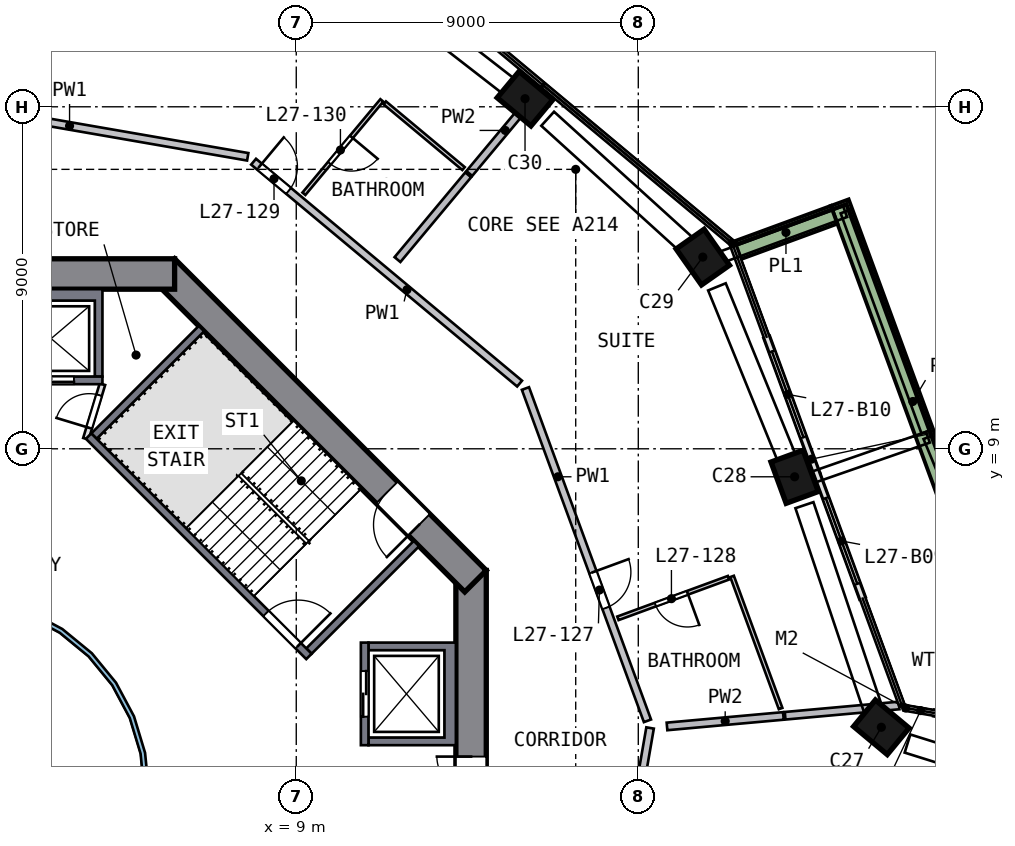
"""IFC4 building model, lengths in metres.
Left out: names, types, materials, properties, quantities, classifications, styles, units other than length and angle.
Written with IfcOpenShell. Run it as: python <this file> out.ifc"""

import sys

from ifc_helpers import new_model, si_unit, direction, frame, frame_2d, origin, origin_2d, place, context, subcontext, project, spatial, polyline, rectangle, outline, extrude, element, fill, save


model = new_model("IFC4")
c1 = context("Model", 3, precision=1e-05, world=origin(), true_north=direction((0.0, 1.0)))
c2 = subcontext(c1, "Body", "Model", "MODEL_VIEW")
j1 = project(units=[si_unit("LENGTHUNIT", "METRE"), si_unit("PLANEANGLEUNIT", "RADIAN")], contexts=[c1])
p1 = place(None, origin())
s1 = spatial("IfcSite", under=j1, at=p1, CompositionType="ELEMENT")
p2 = place(p1, origin())
s2 = spatial("IfcBuilding", under=s1, at=p2, CompositionType="ELEMENT")
p3 = place(p2, frame((0.0, 0.0, 115.0)))
s3 = spatial("IfcBuildingStorey", under=s2, at=p3, CompositionType="ELEMENT", Elevation=115.0)
p4 = place(p3, frame((26.622, 0.833, 0.0), z_axis=(-0.154101199, 0.147745739, 0.976946271), x_axis=(-0.973407273, 0.146921481, -0.175762225)))
e1 = element("IfcColumn", 1, at=p4, inside=s3, PredefinedType="COLUMN", context=c2, shape_type="SweptSolid", body=[
    extrude(rectangle(XDim=0.8, YDim=0.8, at=origin_2d()), origin(), (0.0, 0.0, 1.0), 3.265),
])
p5 = place(p3, frame((24.406, 1.532, 0.0), z_axis=(-0.008285658, 0.115999212, 0.993214746), x_axis=(0.769837685, -0.633159234, 0.080369914)))
e2 = element("IfcColumn", 2, at=p5, inside=s3, PredefinedType="COLUMN", context=c2, shape_type="SweptSolid", body=[
    extrude(rectangle(XDim=1.15, YDim=0.9, at=origin_2d()), origin(), (0.0, 0.0, 1.0), 3.212),
])
p6 = place(p3, frame((22.162, 8.136, 0.0), z_axis=(-0.039546221, 0.105101688, 0.993674862), x_axis=(-0.342030908, 0.932955243, -0.11229146)))
e3 = element("IfcColumn", 3, at=p6, inside=s3, PredefinedType="COLUMN", context=c2, shape_type="SweptSolid", body=[
    extrude(rectangle(XDim=1.15, YDim=0.9, at=origin_2d()), origin(), (0.0, 0.0, 1.0), 3.21),
])
p7 = place(p3, frame((19.779, 13.932, 0.0), z_axis=(-0.067055052, 0.093512147, 0.993357488), x_axis=(0.571992313, -0.812148283, 0.115065024)))
e4 = element("IfcColumn", 4, at=p7, inside=s3, PredefinedType="COLUMN", context=c2, shape_type="SweptSolid", body=[
    extrude(rectangle(XDim=1.15, YDim=0.9, at=origin_2d()), origin(), (0.0, 0.0, 1.0), 3.211),
])
p8 = place(p3, frame((15.125, 18.127, 0.0), z_axis=(-0.086849132, 0.071258876, 0.993669664), x_axis=(-0.7628125, 0.636786768, -0.112337447)))
e5 = element("IfcColumn", 5, at=p8, inside=s3, PredefinedType="COLUMN", context=c2, shape_type="SweptSolid", body=[
    extrude(rectangle(XDim=1.15, YDim=0.9, at=origin_2d()), origin(), (0.0, 0.0, 1.0), 3.21),
])
p9 = place(p3, frame((13.6, -5.799, 0.0), z_axis=(0.0, 0.0, 1.0), x_axis=(0.0, 1.0, 0.0)))
e6 = element("IfcWall", 6, at=p9, inside=s3, PredefinedType="SHEAR", context=c2, shape_type="SweptSolid", body=[
    extrude(rectangle(XDim=11.598, YDim=0.8, at=frame_2d((5.799, 0.0))), origin(), (0.0, 0.0, 1.0), 3.5),
])
p10 = place(p9, frame((4.899, 0.0, 0.0)))
e7 = element("IfcOpeningElement", 7, at=p10, cuts=e6, PredefinedType="OPENING", context=c2, shape_type="SweptSolid", body=[
    extrude(rectangle(XDim=1.8, YDim=2.1, at=frame_2d((0.9, 1.05))), frame((0.0, 0.41, 0.0), z_axis=(0.0, -1.0, 0.0), x_axis=(1.0, 0.0, 0.0)), (0.0, 0.0, 1.0), 0.82),
])
p11 = place(p3, frame((13.717, 5.516, 0.0), z_axis=(0.0, 0.0, 1.0), x_axis=(-0.707106781, 0.707106781, 0.0)))
e8 = element("IfcWall", 8, at=p11, inside=s3, PredefinedType="SHEAR", context=c2, shape_type="SweptSolid", body=[
    extrude(rectangle(XDim=11.598, YDim=0.8, at=frame_2d((5.799, 0.0))), origin(), (0.0, 0.0, 1.0), 3.5),
])
p12 = place(p11, frame((2.099, 0.0, 0.0)))
e9 = element("IfcOpeningElement", 9, at=p12, cuts=e8, PredefinedType="OPENING", context=c2, shape_type="SweptSolid", body=[
    extrude(rectangle(XDim=1.2, YDim=2.1, at=frame_2d((0.6, 1.05))), frame((0.0, 0.41, 0.0), z_axis=(0.0, -1.0, 0.0), x_axis=(1.0, 0.0, 0.0)), (0.0, 0.0, 1.0), 0.82),
])
p13 = place(p3, frame((5.799, 13.6, 0.0), z_axis=(0.0, 0.0, 1.0), x_axis=(-1.0, 0.0, 0.0)))
e10 = element("IfcWall", 10, at=p13, inside=s3, PredefinedType="SHEAR", context=c2, shape_type="SweptSolid", body=[
    extrude(rectangle(XDim=11.598, YDim=0.8, at=frame_2d((5.799, 0.0))), origin(), (0.0, 0.0, 1.0), 3.5),
])
p14 = place(p13, frame((4.899, 0.0, 0.0)))
e11 = element("IfcOpeningElement", 11, at=p14, cuts=e10, PredefinedType="OPENING", context=c2, shape_type="SweptSolid", body=[
    extrude(rectangle(XDim=1.8, YDim=2.1, at=frame_2d((0.9, 1.05))), frame((0.0, 0.41, 0.0), z_axis=(0.0, -1.0, 0.0), x_axis=(1.0, 0.0, 0.0)), (0.0, 0.0, 1.0), 0.82),
])
p15 = place(p3, frame((27.245, 1.795, 0.0), z_axis=(0.0, 0.0, 1.0), x_axis=(-0.985283183, 0.170929952, 0.0)))
e12 = element("IfcWall", 12, at=p15, inside=s3, PredefinedType="SOLIDWALL", context=c2, shape_type="SweptSolid", body=[
    extrude(rectangle(XDim=1.478, YDim=0.15, at=frame_2d((0.739, 0.0))), origin(), (0.0, 0.0, 1.0), 2.425),
])
p16 = place(p3, frame((23.899, 5.073, 0.0), z_axis=(0.0, 0.0, 1.0), x_axis=(-0.344663339, 0.938726362, 0.0)))
e13 = element("IfcWall", 13, at=p16, inside=s3, PredefinedType="SOLIDWALL", context=c2, shape_type="SweptSolid", body=[
    extrude(rectangle(XDim=3.475, YDim=0.15, at=frame_2d((1.738, 0.0))), origin(), (0.0, 0.0, 1.0), 2.425),
])
p17 = place(p16, frame((0.4, 0.0, 0.0)))
e14 = element("IfcOpeningElement", 14, at=p17, cuts=e13, PredefinedType="OPENING", context=c2, shape_type="SweptSolid", body=[
    extrude(rectangle(XDim=2.4, YDim=2.4, at=frame_2d((1.2, 1.2))), frame((0.0, 0.085, 0.0), z_axis=(0.0, -1.0, 0.0), x_axis=(1.0, 0.0, 0.0)), (0.0, 0.0, 1.0), 0.17),
])
p18 = place(p3, frame((22.702, 8.335, 0.0), z_axis=(0.0, 0.0, 1.0), x_axis=(-0.344634313, 0.938737019, 0.0)))
e15 = element("IfcWall", 15, at=p18, inside=s3, PredefinedType="SOLIDWALL", context=c2, shape_type="SweptSolid", body=[
    extrude(rectangle(XDim=3.835, YDim=0.15, at=frame_2d((1.917, 0.0))), origin(), (0.0, 0.0, 1.0), 2.425),
])
p19 = place(p18, frame((1.035, 0.0, 0.0)))
e16 = element("IfcOpeningElement", 16, at=p19, cuts=e15, PredefinedType="OPENING", context=c2, shape_type="SweptSolid", body=[
    extrude(rectangle(XDim=2.4, YDim=2.4, at=frame_2d((1.2, 1.2))), frame((0.0, 0.085, 0.0), z_axis=(0.0, -1.0, 0.0), x_axis=(1.0, 0.0, 0.0)), (0.0, 0.0, 1.0), 0.17),
])
p20 = place(p3, frame((27.145, 5.01, 0.0), z_axis=(0.0, 0.0, 1.0), x_axis=(-0.344632839, 0.93873756, 0.0)))
e17 = element("IfcWall", 17, at=p20, inside=s3, PredefinedType="SOLIDWALL", context=c2, shape_type="SweptSolid", body=[
    extrude(rectangle(XDim=11.152, YDim=0.5, at=frame_2d((5.576, 0.0))), origin(), (0.0, 0.0, 1.0), 0.7),
])
p21 = place(p3, frame((23.153, 15.158, 0.0), z_axis=(0.0, 0.0, 1.0), x_axis=(-0.93869784, -0.344741011, 0.0)))
e18 = element("IfcWall", 18, at=p21, inside=s3, PredefinedType="SOLIDWALL", context=c2, shape_type="SweptSolid", body=[
    extrude(rectangle(XDim=2.699, YDim=0.5, at=frame_2d((1.35, 0.0))), origin(), (0.0, 0.0, 1.0), 0.7),
])
p22 = place(p3, origin())
e19 = element("IfcWall", 19, at=p22, inside=s3, PredefinedType="SOLIDWALL", context=c2, shape_type="SweptSolid", body=[
    extrude(outline(polyline([(13.2, 3.9), (13.2, 1.2), (10.9, 1.2), (10.9, 1.4), (12.9, 1.4), (12.9, 3.7), (10.9, 3.7), (10.9, 3.9), (13.2, 3.9)])), origin(), (0.0, 0.0, 1.0), 3.19),
])
p23 = place(p3, frame((10.8, 1.2, 0.0), z_axis=(0.0, 0.0, 1.0), x_axis=(0.0, 1.0, 0.0)))
e20 = element("IfcWall", 20, at=p23, inside=s3, PredefinedType="SOLIDWALL", context=c2, shape_type="SweptSolid", body=[
    extrude(rectangle(XDim=2.7, YDim=0.2, at=frame_2d((1.35, 0.0))), origin(), (0.0, 0.0, 1.0), 3.19),
])
p24 = place(p23, frame((0.75, 0.0, 0.0)))
e21 = element("IfcOpeningElement", 21, at=p24, cuts=e20, PredefinedType="OPENING", context=c2, shape_type="SweptSolid", body=[
    extrude(rectangle(XDim=1.2, YDim=2.1, at=frame_2d((0.6, 1.05))), frame((0.0, 0.11, 0.0), z_axis=(0.0, -1.0, 0.0), x_axis=(1.0, 0.0, 0.0)), (0.0, 0.0, 1.0), 0.22),
])
p25 = place(p3, origin())
e22 = element("IfcWall", 22, at=p25, inside=s3, PredefinedType="SOLIDWALL", context=c2, shape_type="SweptSolid", body=[
    extrude(outline(polyline([(3.9, 13.2), (3.9, 10.9), (3.7, 10.9), (3.7, 12.9), (1.4, 12.9), (1.4, 10.9), (1.2, 10.9), (1.2, 13.2), (3.9, 13.2)])), origin(), (0.0, 0.0, 1.0), 3.19),
])
p26 = place(p3, frame((1.2, 10.8, 0.0), z_axis=(0.0, 0.0, 1.0), x_axis=(1.0, 0.0, 0.0)))
e23 = element("IfcWall", 23, at=p26, inside=s3, PredefinedType="SOLIDWALL", context=c2, shape_type="SweptSolid", body=[
    extrude(rectangle(XDim=2.7, YDim=0.2, at=frame_2d((1.35, 0.0))), origin(), (0.0, 0.0, 1.0), 3.19),
])
p27 = place(p26, frame((0.75, 0.0, 0.0)))
e24 = element("IfcOpeningElement", 24, at=p27, cuts=e23, PredefinedType="OPENING", context=c2, shape_type="SweptSolid", body=[
    extrude(rectangle(XDim=1.2, YDim=2.1, at=frame_2d((0.6, 1.05))), frame((0.0, 0.11, 0.0), z_axis=(0.0, -1.0, 0.0), x_axis=(1.0, 0.0, 0.0)), (0.0, 0.0, 1.0), 0.22),
])
p28 = place(p3, frame((3.535, 9.334, 0.0), z_axis=(0.0, 0.0, 1.0), x_axis=(0.707106781, -0.707106781, 0.0)))
e25 = element("IfcWall", 25, at=p28, inside=s3, PredefinedType="SOLIDWALL", context=c2, shape_type="SweptSolid", body=[
    extrude(rectangle(XDim=8.2, YDim=0.2, at=frame_2d((4.1, 0.0))), origin(), (0.0, 0.0, 1.0), 3.19),
])
p29 = place(p28, frame((6.6, 0.0, 0.0)))
e26 = element("IfcOpeningElement", 26, at=p29, cuts=e25, PredefinedType="OPENING", context=c2, shape_type="SweptSolid", body=[
    extrude(rectangle(XDim=1.2, YDim=2.1, at=frame_2d((0.6, 1.05))), frame((0.0, 0.11, 0.0), z_axis=(0.0, -1.0, 0.0), x_axis=(1.0, 0.0, 0.0)), (0.0, 0.0, 1.0), 0.22),
])
for number, where, z_axis, x_axis in (
    (27, (9.334, 3.677, 0.0), (0.0, 0.0, 1.0), (0.707, 0.707, 0.0)),
    (28, (3.677, 9.334, 0.0), (0.0, 0.0, 1.0), (0.707, 0.707, 0.0)),
):
    element("IfcWall", number, at=place(p3, frame(where, z_axis=z_axis, x_axis=x_axis)), inside=s3, PredefinedType="SOLIDWALL", context=c2, shape_type="SweptSolid", body=[
        extrude(rectangle(XDim=4.0, YDim=0.2, at=frame_2d((2.0, 0.0))), origin(), (0.0, 0.0, 1.0), 3.19),
    ])
p30 = place(p3, frame((3.465, 9.263, 0.0), z_axis=(0.0, 0.0, 1.0), x_axis=(0.289808785, 0.957084567, 0.0)))
e29 = element("IfcWall", 29, at=p30, inside=s3, PredefinedType="PARTITIONING", context=c2, shape_type="SweptSolid", body=[
    extrude(rectangle(XDim=1.501, YDim=0.15, at=frame_2d((0.75, 0.0))), origin(), (0.0, 0.0, 1.0), 3.19),
])
p31 = place(p30, frame((0.301, 0.0, 0.0)))
e30 = element("IfcOpeningElement", 30, at=p31, cuts=e29, PredefinedType="OPENING", context=c2, shape_type="SweptSolid", body=[
    extrude(rectangle(XDim=0.9, YDim=2.1, at=frame_2d((0.45, 1.05))), frame((0.0, 0.085, 0.0), z_axis=(0.0, -1.0, 0.0), x_axis=(1.0, 0.0, 0.0)), (0.0, 0.0, 1.0), 0.17),
])
p32 = place(p3, origin())
e31 = element("IfcWall", 31, at=p32, inside=s3, PredefinedType="SOLIDWALL", context=c2, shape_type="SweptSolid", body=[
    extrude(outline(polyline([(5.021, -0.999), (4.73, -1.959), (4.257, -2.844), (3.62, -3.62), (2.844, -4.257), (1.959, -4.73), (0.999, -5.021), (0.0, -5.12), (-0.999, -5.021), (-1.959, -4.73), (-2.844, -4.257), (-3.62, -3.62), (-4.257, -2.844), (-4.73, -1.959), (-5.021, -0.999), (-5.12, 0.0), (-5.021, 0.999), (-4.73, 1.959), (-4.257, 2.844), (-3.62, 3.62), (-2.844, 4.257), (-1.959, 4.73), (-0.999, 5.021), (0.0, 5.12), (0.999, 5.021), (1.959, 4.73), (2.844, 4.257), (3.62, 3.62), (4.257, 2.844), (4.73, 1.959), (5.021, 0.999), (5.12, 0.0), (5.021, -0.999)]), holes=[polyline([(4.904, 0.976), (4.619, 1.913), (4.157, 2.778), (3.535, 3.535), (2.778, 4.157), (1.913, 4.619), (0.976, 4.904), (0.0, 5.0), (-0.976, 4.904), (-1.913, 4.619), (-2.778, 4.157), (-3.535, 3.535), (-4.157, 2.778), (-4.619, 1.913), (-4.904, 0.976), (-5.0, 0.0), (-4.904, -0.976), (-4.619, -1.913), (-4.157, -2.778), (-3.535, -3.535), (-2.778, -4.157), (-1.913, -4.619), (-0.976, -4.904), (0.0, -5.0), (0.976, -4.904), (1.913, -4.619), (2.778, -4.157), (3.535, -3.535), (4.157, -2.778), (4.619, -1.913), (4.904, -0.976), (5.0, 0.0), (4.904, 0.976)])]), origin(), (0.0, 0.0, 1.0), 3.19),
])
p33 = place(p3, frame((7.723, 16.684, 0.0), z_axis=(0.0, 0.0, 1.0), x_axis=(-0.985289421, 0.170893991, 0.0)))
e32 = element("IfcWall", 32, at=p33, inside=s3, PredefinedType="SOLIDWALL", context=c2, shape_type="SweptSolid", body=[
    extrude(rectangle(XDim=9.516, YDim=0.2, at=frame_2d((4.758, 0.0))), origin(), (0.0, 0.0, 1.0), 3.19),
])
p34 = place(p3, frame((7.877, 16.555, 0.0), z_axis=(0.0, 0.0, 1.0), x_axis=(0.767836961, -0.6406453, 0.0)))
e33 = element("IfcWall", 33, at=p34, inside=s3, PredefinedType="SOLIDWALL", context=c2, shape_type="SweptSolid", body=[
    extrude(rectangle(XDim=9.115, YDim=0.2, at=frame_2d((4.558, 0.0))), origin(), (0.0, 0.0, 1.0), 3.19),
])
p35 = place(p34, frame((0.2, 0.0, 0.0)))
e34 = element("IfcOpeningElement", 34, at=p35, cuts=e33, PredefinedType="OPENING", context=c2, shape_type="SweptSolid", body=[
    extrude(rectangle(XDim=1.0, YDim=2.1, at=frame_2d((0.5, 1.05))), frame((0.0, 0.11, 0.0), z_axis=(0.0, -1.0, 0.0), x_axis=(1.0, 0.0, 0.0)), (0.0, 0.0, 1.0), 0.22),
])
p36 = place(p3, frame((15.031, 10.587, 0.0), z_axis=(0.0, 0.0, 1.0), x_axis=(0.344638859, -0.93873535, 0.0)))
e35 = element("IfcWall", 35, at=p36, inside=s3, PredefinedType="SOLIDWALL", context=c2, shape_type="SweptSolid", body=[
    extrude(rectangle(XDim=9.316, YDim=0.2, at=frame_2d((4.658, 0.0))), origin(), (0.0, 0.0, 1.0), 3.19),
])
p37 = place(p36, frame((5.15, 0.0, 0.0)))
e36 = element("IfcOpeningElement", 36, at=p37, cuts=e35, PredefinedType="OPENING", context=c2, shape_type="SweptSolid", body=[
    extrude(rectangle(XDim=1.0, YDim=2.1, at=frame_2d((0.5, 1.05))), frame((0.0, 0.11, 0.0), z_axis=(0.0, -1.0, 0.0), x_axis=(1.0, 0.0, 0.0)), (0.0, 0.0, 1.0), 0.22),
])
p38 = place(p3, frame((17.719, -1.754, 0.0), z_axis=(0.0, 0.0, 1.0), x_axis=(0.170909172, 0.985286788, 0.0)))
e37 = element("IfcWall", 37, at=p38, inside=s3, PredefinedType="SOLIDWALL", context=c2, shape_type="SweptSolid", body=[
    extrude(rectangle(XDim=3.458, YDim=0.2, at=frame_2d((1.729, 0.0))), origin(), (0.0, 0.0, 1.0), 3.19),
])
p39 = place(p3, frame((11.663, 13.979, 0.0), z_axis=(0.0, 0.0, 1.0), x_axis=(0.64065553, 0.767828426, 0.0)))
e38 = element("IfcWall", 38, at=p39, inside=s3, PredefinedType="SOLIDWALL", context=c2, shape_type="SweptSolid", body=[
    extrude(rectangle(XDim=2.905, YDim=0.2, at=frame_2d((1.452, 0.0))), origin(), (0.0, 0.0, 1.0), 3.19),
])
p40 = place(p3, frame((13.554, 16.245, 0.0), z_axis=(0.0, 0.0, 1.0), x_axis=(0.640639847, 0.767841511, 0.0)))
e39 = element("IfcWall", 39, at=p40, inside=s3, PredefinedType="SOLIDWALL", context=c2, shape_type="SweptSolid", body=[
    extrude(rectangle(XDim=2.952, YDim=0.2, at=frame_2d((1.476, 0.0))), origin(), (0.0, 0.0, 1.0), 3.19),
])
p41 = place(p3, frame((18.756, 1.694, 0.0), z_axis=(0.0, 0.0, 1.0), x_axis=(0.995945109, 0.089962992, 0.0)))
e40 = element("IfcWall", 40, at=p41, inside=s3, PredefinedType="SOLIDWALL", context=c2, shape_type="SweptSolid", body=[
    extrude(rectangle(XDim=3.075, YDim=0.2, at=frame_2d((1.537, 0.0))), origin(), (0.0, 0.0, 1.0), 3.19),
])
p42 = place(p3, frame((21.864, 1.974, 0.0), z_axis=(0.0, 0.0, 1.0), x_axis=(0.995949501, 0.08991436, 0.0)))
e41 = element("IfcWall", 41, at=p42, inside=s3, PredefinedType="SOLIDWALL", context=c2, shape_type="SweptSolid", body=[
    extrude(rectangle(XDim=3.011, YDim=0.2, at=frame_2d((1.506, 0.0))), origin(), (0.0, 0.0, 1.0), 3.19),
])
p43 = place(p3, frame((11.251, 18.168, 0.0), z_axis=(0.0, 0.0, 1.0), x_axis=(-0.640612028, -0.767864721, 0.0)))
e42 = element("IfcWall", 42, at=p43, inside=s3, PredefinedType="PARTITIONING", context=c2, shape_type="SweptSolid", body=[
    extrude(rectangle(XDim=3.2, YDim=0.1, at=frame_2d((1.6, 0.0))), origin(), (0.0, 0.0, 1.0), 3.19),
])
p44 = place(p43, frame((1.25, 0.0, 0.0)))
e43 = element("IfcOpeningElement", 43, at=p44, cuts=e42, PredefinedType="OPENING", context=c2, shape_type="SweptSolid", body=[
    extrude(rectangle(XDim=0.9, YDim=2.1, at=frame_2d((0.45, 1.05))), frame((0.0, 0.06, 0.0), z_axis=(0.0, -1.0, 0.0), x_axis=(1.0, 0.0, 0.0)), (0.0, 0.0, 1.0), 0.12),
])
p45 = place(p3, frame((11.328, 18.104, 0.0), z_axis=(0.0, 0.0, 1.0), x_axis=(0.767813462, -0.640673464, 0.0)))
e44 = element("IfcWall", 44, at=p45, inside=s3, PredefinedType="PARTITIONING", context=c2, shape_type="SweptSolid", body=[
    extrude(rectangle(XDim=2.7, YDim=0.1, at=frame_2d((1.35, 0.0))), origin(), (0.0, 0.0, 1.0), 3.19),
])
p46 = place(p3, frame((20.374, 5.607, 0.0), z_axis=(0.0, 0.0, 1.0), x_axis=(-0.938740488, -0.344624864, 0.0)))
e45 = element("IfcWall", 45, at=p46, inside=s3, PredefinedType="PARTITIONING", context=c2, shape_type="SweptSolid", body=[
    extrude(rectangle(XDim=3.1, YDim=0.1, at=frame_2d((1.55, 0.0))), origin(), (0.0, 0.0, 1.0), 3.19),
])
p47 = place(p46, frame((1.15, 0.0, 0.0)))
e46 = element("IfcOpeningElement", 46, at=p47, cuts=e45, PredefinedType="OPENING", context=c2, shape_type="SweptSolid", body=[
    extrude(rectangle(XDim=0.9, YDim=2.1, at=frame_2d((0.45, 1.05))), frame((0.0, 0.06, 0.0), z_axis=(0.0, -1.0, 0.0), x_axis=(1.0, 0.0, 0.0)), (0.0, 0.0, 1.0), 0.12),
])
p48 = place(p3, frame((20.468, 5.642, 0.0), z_axis=(0.0, 0.0, 1.0), x_axis=(0.344636129, -0.938736352, 0.0)))
e47 = element("IfcWall", 47, at=p48, inside=s3, PredefinedType="PARTITIONING", context=c2, shape_type="SweptSolid", body=[
    extrude(rectangle(XDim=3.704, YDim=0.1, at=frame_2d((1.852, 0.0))), origin(), (0.0, 0.0, 1.0), 3.19),
])
p49 = place(p17, origin())
e48 = element("IfcDoor", 48, at=p49, inside=s3, OperationType="SLIDING_TO_RIGHT", PredefinedType="DOOR", context=c2, shape_type="SweptSolid", body=[
    extrude(rectangle(XDim=2.4, YDim=2.4, at=frame_2d((1.2, 1.2))), frame((0.0, 0.025, 0.0), z_axis=(0.0, -1.0, 0.0), x_axis=(1.0, 0.0, 0.0)), (0.0, 0.0, 1.0), 0.05),
])
fill(e14, e48)
p50 = place(p19, origin())
e49 = element("IfcDoor", 49, at=p50, inside=s3, OperationType="SLIDING_TO_LEFT", PredefinedType="DOOR", context=c2, shape_type="SweptSolid", body=[
    extrude(rectangle(XDim=2.4, YDim=2.4, at=frame_2d((1.2, 1.2))), frame((0.0, 0.025, 0.0), z_axis=(0.0, -1.0, 0.0), x_axis=(1.0, 0.0, 0.0)), (0.0, 0.0, 1.0), 0.05),
])
fill(e16, e49)
p51 = place(p24, origin())
e50 = element("IfcDoor", 50, at=p51, inside=s3, OperationType="DOUBLE_DOOR_SLIDING", PredefinedType="DOOR", context=c2, shape_type="SweptSolid", body=[
    extrude(rectangle(XDim=1.2, YDim=2.1, at=frame_2d((0.6, 1.05))), frame((0.0, 0.025, 0.0), z_axis=(0.0, -1.0, 0.0), x_axis=(1.0, 0.0, 0.0)), (0.0, 0.0, 1.0), 0.05),
])
fill(e21, e50)
p52 = place(p27, origin())
e51 = element("IfcDoor", 51, at=p52, inside=s3, OperationType="DOUBLE_DOOR_SLIDING", PredefinedType="DOOR", context=c2, shape_type="SweptSolid", body=[
    extrude(rectangle(XDim=1.2, YDim=2.1, at=frame_2d((0.6, 1.05))), frame((0.0, 0.025, 0.0), z_axis=(0.0, -1.0, 0.0), x_axis=(1.0, 0.0, 0.0)), (0.0, 0.0, 1.0), 0.05),
])
fill(e24, e51)
p53 = place(p29, origin())
e52 = element("IfcDoor", 52, at=p53, inside=s3, OperationType="SINGLE_SWING_RIGHT", PredefinedType="DOOR", context=c2, shape_type="SweptSolid", body=[
    extrude(rectangle(XDim=1.2, YDim=2.1, at=frame_2d((0.6, 1.05))), frame((0.0, 0.025, 0.0), z_axis=(0.0, -1.0, 0.0), x_axis=(1.0, 0.0, 0.0)), (0.0, 0.0, 1.0), 0.05),
])
fill(e26, e52)
p54 = place(p10, origin())
e53 = element("IfcDoor", 53, at=p54, inside=s3, OperationType="DOUBLE_DOOR_SINGLE_SWING", PredefinedType="DOOR", context=c2, shape_type="SweptSolid", body=[
    extrude(rectangle(XDim=1.8, YDim=2.1, at=frame_2d((0.9, 1.05))), frame((0.0, 0.025, 0.0), z_axis=(0.0, -1.0, 0.0), x_axis=(1.0, 0.0, 0.0)), (0.0, 0.0, 1.0), 0.05),
])
fill(e7, e53)
p55 = place(p12, origin())
e54 = element("IfcDoor", 54, at=p55, inside=s3, OperationType="SINGLE_SWING_LEFT", PredefinedType="DOOR", context=c2, shape_type="SweptSolid", body=[
    extrude(rectangle(XDim=1.2, YDim=2.1, at=frame_2d((0.6, 1.05))), frame((0.0, 0.025, 0.0), z_axis=(0.0, -1.0, 0.0), x_axis=(1.0, 0.0, 0.0)), (0.0, 0.0, 1.0), 0.05),
])
fill(e9, e54)
p56 = place(p31, origin())
e55 = element("IfcDoor", 55, at=p56, inside=s3, OperationType="SINGLE_SWING_LEFT", PredefinedType="DOOR", context=c2, shape_type="SweptSolid", body=[
    extrude(rectangle(XDim=0.9, YDim=2.1, at=frame_2d((0.45, 1.05))), frame((0.0, 0.025, 0.0), z_axis=(0.0, -1.0, 0.0), x_axis=(1.0, 0.0, 0.0)), (0.0, 0.0, 1.0), 0.05),
])
fill(e30, e55)
p57 = place(p37, origin())
e56 = element("IfcDoor", 56, at=p57, inside=s3, OperationType="SINGLE_SWING_LEFT", PredefinedType="DOOR", context=c2, shape_type="SweptSolid", body=[
    extrude(rectangle(XDim=1.0, YDim=2.1, at=frame_2d((0.5, 1.05))), frame((0.0, 0.025, 0.0), z_axis=(0.0, -1.0, 0.0), x_axis=(1.0, 0.0, 0.0)), (0.0, 0.0, 1.0), 0.05),
])
fill(e36, e56)
p58 = place(p47, origin())
e57 = element("IfcDoor", 57, at=p58, inside=s3, OperationType="SINGLE_SWING_LEFT", PredefinedType="DOOR", context=c2, shape_type="SweptSolid", body=[
    extrude(rectangle(XDim=0.9, YDim=2.1, at=frame_2d((0.45, 1.05))), frame((0.0, 0.025, 0.0), z_axis=(0.0, -1.0, 0.0), x_axis=(1.0, 0.0, 0.0)), (0.0, 0.0, 1.0), 0.05),
])
fill(e46, e57)
p59 = place(p35, origin())
e58 = element("IfcDoor", 58, at=p59, inside=s3, OperationType="SINGLE_SWING_LEFT", PredefinedType="DOOR", context=c2, shape_type="SweptSolid", body=[
    extrude(rectangle(XDim=1.0, YDim=2.1, at=frame_2d((0.5, 1.05))), frame((0.0, 0.025, 0.0), z_axis=(0.0, -1.0, 0.0), x_axis=(1.0, 0.0, 0.0)), (0.0, 0.0, 1.0), 0.05),
])
fill(e34, e58)
p60 = place(p44, origin())
e59 = element("IfcDoor", 59, at=p60, inside=s3, OperationType="SINGLE_SWING_LEFT", PredefinedType="DOOR", context=c2, shape_type="SweptSolid", body=[
    extrude(rectangle(XDim=0.9, YDim=2.1, at=frame_2d((0.45, 1.05))), frame((0.0, 0.025, 0.0), z_axis=(0.0, -1.0, 0.0), x_axis=(1.0, 0.0, 0.0)), (0.0, 0.0, 1.0), 0.05),
])
fill(e43, e59)
save(model, sys.argv[1])
